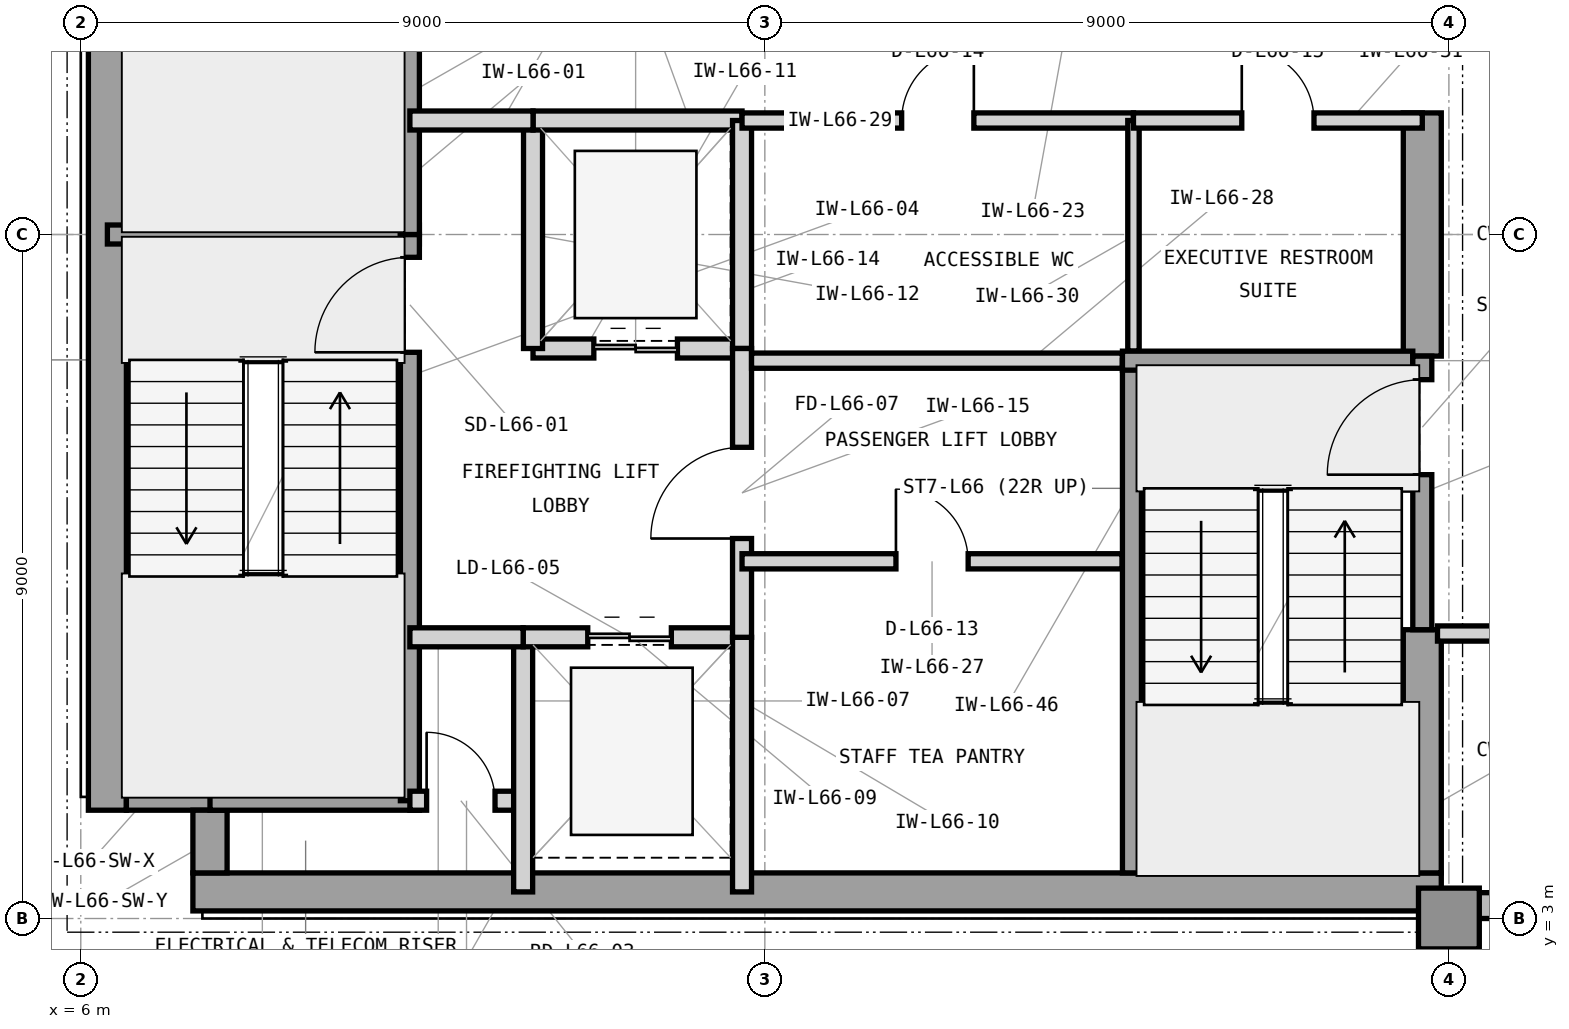
"""IFC4 building model, lengths in metres.
Left out: names, types, materials, properties, quantities, classifications, styles, units other than length and angle.
Written with IfcOpenShell. Run it as: python <this file> out.ifc"""

import sys

from ifc_helpers import new_model, si_unit, direction, frame, frame_2d, origin, origin_2d, place, context, subcontext, project, spatial, rectangle, extrude, element, fill, save


model = new_model("IFC4")
c1 = context("Model", 3, precision=1e-05, world=origin(), true_north=direction((0.0, 1.0)))
c2 = subcontext(c1, "Body", "Model", "MODEL_VIEW")
j1 = project(units=[si_unit("LENGTHUNIT", "METRE"), si_unit("PLANEANGLEUNIT", "RADIAN")], contexts=[c1])
p1 = place(None, origin())
s1 = spatial("IfcSite", under=j1, at=p1, CompositionType="ELEMENT")
p2 = place(p1, origin())
s2 = spatial("IfcBuilding", under=s1, at=p2, CompositionType="ELEMENT")
p3 = place(p2, frame((0.0, 0.0, 270.3)))
s3 = spatial("IfcBuildingStorey", under=s2, at=p3, CompositionType="ELEMENT", Elevation=270.3)
p4 = place(p3, frame((7.475, 3.35, 0.0), z_axis=(0.0, 0.0, 1.0), x_axis=(1.0, 0.0, 0.0)))
e1 = element("IfcWall", 1, at=p4, inside=s3, PredefinedType="SHEAR", context=c2, shape_type="SweptSolid", body=[
    extrude(rectangle(XDim=16.425, YDim=0.5, at=frame_2d((8.212, 0.0))), origin(), (0.0, 0.0, 1.0), 3.9),
])
p5 = place(p3, frame((6.35, 4.425, 0.0), z_axis=(0.0, 0.0, 1.0), x_axis=(0.0, 1.0, 0.0)))
e2 = element("IfcWall", 2, at=p5, inside=s3, PredefinedType="SHEAR", context=c2, shape_type="SweptSolid", body=[
    extrude(rectangle(XDim=15.15, YDim=0.5, at=frame_2d((7.575, 0.0))), origin(), (0.0, 0.0, 1.0), 3.9),
])
p6 = place(p3, frame((23.65, 3.6, 0.0), z_axis=(0.0, 0.0, 1.0), x_axis=(0.0, 1.0, 0.0)))
e3 = element("IfcWall", 3, at=p6, inside=s3, PredefinedType="SHEAR", context=c2, shape_type="SweptSolid", body=[
    extrude(rectangle(XDim=3.2, YDim=0.5, at=frame_2d((1.6, 0.0))), origin(), (0.0, 0.0, 1.0), 3.9),
])
p7 = place(p3, frame((23.65, 10.4, 0.0), z_axis=(0.0, 0.0, 1.0), x_axis=(0.0, 1.0, 0.0)))
e4 = element("IfcWall", 4, at=p7, inside=s3, PredefinedType="SHEAR", context=c2, shape_type="SweptSolid", body=[
    extrude(rectangle(XDim=3.2, YDim=0.5, at=frame_2d((1.6, 0.0))), origin(), (0.0, 0.0, 1.0), 3.9),
])
p8 = place(p3, frame((6.6, 4.65, 0.0), z_axis=(0.0, 0.0, 1.0), x_axis=(1.0, 0.0, 0.0)))
e5 = element("IfcWall", 5, at=p8, inside=s3, PredefinedType="SHEAR", context=c2, shape_type="SweptSolid", body=[
    extrude(rectangle(XDim=1.325, YDim=0.45, at=frame_2d((0.663, 0.0))), origin(), (0.0, 0.0, 1.0), 3.9),
])
p9 = place(p3, frame((7.7, 3.6, 0.0), z_axis=(0.0, 0.0, 1.0), x_axis=(0.0, 1.0, 0.0)))
e6 = element("IfcWall", 6, at=p9, inside=s3, PredefinedType="SHEAR", context=c2, shape_type="SweptSolid", body=[
    extrude(rectangle(XDim=0.825, YDim=0.45, at=frame_2d((0.413, 0.0))), origin(), (0.0, 0.0, 1.0), 3.9),
])
p10 = place(p3, frame((24.0, 3.0, 0.0), z_axis=(0.0, 0.0, 1.0), x_axis=(1.0, 0.0, 0.0)))
e7 = element("IfcColumn", 7, at=p10, inside=s3, PredefinedType="COLUMN", context=c2, shape_type="SweptSolid", body=[
    extrude(rectangle(XDim=0.8, YDim=0.8, at=origin_2d()), origin(), (0.0, 0.0, 1.0), 3.9),
])
p11 = place(p3, frame((23.9, 3.17, 0.0), z_axis=(0.0, 0.0, 1.0), x_axis=(1.0, 0.0, 0.0)))
e8 = element("IfcWall", 8, at=p11, inside=s3, PredefinedType="STANDARD", context=c2, shape_type="SweptSolid", body=[
    extrude(rectangle(XDim=28.5, YDim=0.34, at=frame_2d((14.25, 0.0))), origin(), (0.0, 0.0, 1.0), 3.715),
])
p12 = place(p11, frame((10.575, 0.0, 0.8)))
e9 = element("IfcOpeningElement", 9, at=p12, cuts=e8, PredefinedType="OPENING", context=c2, shape_type="SweptSolid", body=[
    extrude(rectangle(XDim=2.6, YDim=2.35, at=frame_2d((1.3, 1.175))), frame((0.0, 0.18, 0.0), z_axis=(0.0, -1.0, 0.0), x_axis=(1.0, 0.0, 0.0)), (0.0, 0.0, 1.0), 0.36),
])
p13 = place(p11, frame((1.1, 0.0, 0.8)))
e10 = element("IfcOpeningElement", 10, at=p13, cuts=e8, PredefinedType="OPENING", context=c2, shape_type="SweptSolid", body=[
    extrude(rectangle(XDim=1.2, YDim=2.35, at=frame_2d((0.6, 1.175))), frame((0.0, 0.18, 0.0), z_axis=(0.0, -1.0, 0.0), x_axis=(1.0, 0.0, 0.0)), (0.0, 0.0, 1.0), 0.36),
])
p14 = place(p11, frame((3.826, 0.0, 0.8)))
e11 = element("IfcOpeningElement", 11, at=p14, cuts=e8, PredefinedType="OPENING", context=c2, shape_type="SweptSolid", body=[
    extrude(rectangle(XDim=2.6, YDim=2.35, at=frame_2d((1.3, 1.175))), frame((0.0, 0.18, 0.0), z_axis=(0.0, -1.0, 0.0), x_axis=(1.0, 0.0, 0.0)), (0.0, 0.0, 1.0), 0.36),
])
p15 = place(p11, frame((14.525, 0.0, 0.8)))
e12 = element("IfcOpeningElement", 12, at=p15, cuts=e8, PredefinedType="OPENING", context=c2, shape_type="SweptSolid", body=[
    extrude(rectangle(XDim=2.6, YDim=2.35, at=frame_2d((1.3, 1.175))), frame((0.0, 0.18, 0.0), z_axis=(0.0, -1.0, 0.0), x_axis=(1.0, 0.0, 0.0)), (0.0, 0.0, 1.0), 0.36),
])
p16 = place(p3, frame((6.35, 12.0, 0.0), z_axis=(0.0, 0.0, 1.0), x_axis=(1.0, 0.0, 0.0)))
e13 = element("IfcWall", 13, at=p16, inside=s3, PredefinedType="SHEAR", context=c2, shape_type="SweptSolid", body=[
    extrude(rectangle(XDim=4.105, YDim=0.25, at=frame_2d((2.052, 0.0))), origin(), (0.0, 0.0, 1.0), 3.9),
])
p17 = place(p3, frame((7.7, 4.55, 0.0), z_axis=(0.0, 0.0, 1.0), x_axis=(1.0, 0.0, 0.0)))
e14 = element("IfcWall", 14, at=p17, inside=s3, PredefinedType="SHEAR", context=c2, shape_type="SweptSolid", body=[
    extrude(rectangle(XDim=2.755, YDim=0.25, at=frame_2d((1.377, 0.0))), origin(), (0.0, 0.0, 1.0), 3.9),
])
p18 = place(p3, frame((10.33, 4.55, 0.0), z_axis=(0.0, 0.0, 1.0), x_axis=(0.0, 1.0, 0.0)))
e15 = element("IfcWall", 15, at=p18, inside=s3, PredefinedType="SHEAR", context=c2, shape_type="SweptSolid", body=[
    extrude(rectangle(XDim=7.45, YDim=0.25, at=frame_2d((3.725, 0.0))), origin(), (0.0, 0.0, 1.0), 3.9),
])
p19 = place(p18, frame((5.9, 0.0, 0.0)))
e16 = element("IfcOpeningElement", 16, at=p19, cuts=e15, PredefinedType="OPENING", context=c2, shape_type="SweptSolid", body=[
    extrude(rectangle(XDim=1.25, YDim=2.2, at=frame_2d((0.625, 1.1))), frame((0.0, 0.135, 0.0), z_axis=(0.0, -1.0, 0.0), x_axis=(1.0, 0.0, 0.0)), (0.0, 0.0, 1.0), 0.27),
])
p20 = place(p3, frame((10.33, 12.0, 0.0), z_axis=(0.0, 0.0, 1.0), x_axis=(0.0, 1.0, 0.0)))
e17 = element("IfcWall", 17, at=p20, inside=s3, PredefinedType="SHEAR", context=c2, shape_type="SweptSolid", body=[
    extrude(rectangle(XDim=7.45, YDim=0.25, at=frame_2d((3.725, 0.0))), origin(), (0.0, 0.0, 1.0), 3.9),
])
p21 = place(p20, frame((5.85, 0.0, 0.0)))
e18 = element("IfcOpeningElement", 18, at=p21, cuts=e17, PredefinedType="OPENING", context=c2, shape_type="SweptSolid", body=[
    extrude(rectangle(XDim=1.25, YDim=2.2, at=frame_2d((0.625, 1.1))), frame((0.0, 0.135, 0.0), z_axis=(0.0, -1.0, 0.0), x_axis=(1.0, 0.0, 0.0)), (0.0, 0.0, 1.0), 0.27),
])
p22 = place(p3, frame((10.33, 4.55, 0.0), z_axis=(0.0, 0.0, 1.0), x_axis=(1.0, 0.0, 0.0)))
e19 = element("IfcWall", 19, at=p22, inside=s3, PredefinedType="PARTITIONING", context=c2, shape_type="SweptSolid", body=[
    extrude(rectangle(XDim=1.49, YDim=0.25, at=frame_2d((0.745, 0.0))), origin(), (0.0, 0.0, 1.0), 3.705),
])
p23 = place(p22, frame((0.22, 0.0, 0.0)))
e20 = element("IfcOpeningElement", 20, at=p23, cuts=e19, PredefinedType="OPENING", context=c2, shape_type="SweptSolid", body=[
    extrude(rectangle(XDim=0.9, YDim=2.1, at=frame_2d((0.45, 1.05))), frame((0.0, 0.135, 0.0), z_axis=(0.0, -1.0, 0.0), x_axis=(1.0, 0.0, 0.0)), (0.0, 0.0, 1.0), 0.27),
])
p24 = place(p3, frame((11.82, 3.35, 0.0), z_axis=(0.0, 0.0, 1.0), x_axis=(0.0, 1.0, 0.0)))
e21 = element("IfcWall", 21, at=p24, inside=s3, PredefinedType="PARTITIONING", context=c2, shape_type="SweptSolid", body=[
    extrude(rectangle(XDim=3.35, YDim=0.25, at=frame_2d((1.675, 0.0))), origin(), (0.0, 0.0, 1.0), 3.705),
])
p25 = place(p3, frame((11.82, 6.7, 0.0), z_axis=(0.0, 0.0, 1.0), x_axis=(1.0, 0.0, 0.0)))
e22 = element("IfcWall", 22, at=p25, inside=s3, PredefinedType="PARTITIONING", context=c2, shape_type="SweptSolid", body=[
    extrude(rectangle(XDim=2.88, YDim=0.25, at=frame_2d((1.44, 0.0))), origin(), (0.0, 0.0, 1.0), 3.088),
])
p26 = place(p25, frame((0.85, 0.0, 0.0)))
e23 = element("IfcOpeningElement", 23, at=p26, cuts=e22, PredefinedType="OPENING", context=c2, shape_type="SweptSolid", body=[
    extrude(rectangle(XDim=1.1, YDim=2.25, at=frame_2d((0.55, 1.125))), frame((0.0, 0.135, 0.0), z_axis=(0.0, -1.0, 0.0), x_axis=(1.0, 0.0, 0.0)), (0.0, 0.0, 1.0), 0.27),
])
p27 = place(p3, frame((14.7, 3.35, 0.0), z_axis=(0.0, 0.0, 1.0), x_axis=(0.0, 1.0, 0.0)))
e24 = element("IfcWall", 24, at=p27, inside=s3, PredefinedType="PARTITIONING", context=c2, shape_type="SweptSolid", body=[
    extrude(rectangle(XDim=3.35, YDim=0.25, at=frame_2d((1.675, 0.0))), origin(), (0.0, 0.0, 1.0), 3.705),
])
p28 = place(p3, frame((11.95, 10.5, 0.0), z_axis=(0.0, 0.0, 1.0), x_axis=(1.0, 0.0, 0.0)))
e25 = element("IfcWall", 25, at=p28, inside=s3, PredefinedType="PARTITIONING", context=c2, shape_type="SweptSolid", body=[
    extrude(rectangle(XDim=2.75, YDim=0.25, at=frame_2d((1.375, 0.0))), origin(), (0.0, 0.0, 1.0), 3.088),
])
p29 = place(p28, frame((0.8, 0.0, 0.0)))
e26 = element("IfcOpeningElement", 26, at=p29, cuts=e25, PredefinedType="OPENING", context=c2, shape_type="SweptSolid", body=[
    extrude(rectangle(XDim=1.1, YDim=2.25, at=frame_2d((0.55, 1.125))), frame((0.0, 0.135, 0.0), z_axis=(0.0, -1.0, 0.0), x_axis=(1.0, 0.0, 0.0)), (0.0, 0.0, 1.0), 0.27),
])
p30 = place(p3, frame((11.95, 10.5, 0.0), z_axis=(0.0, 0.0, 1.0), x_axis=(0.0, 1.0, 0.0)))
e27 = element("IfcWall", 27, at=p30, inside=s3, PredefinedType="PARTITIONING", context=c2, shape_type="SweptSolid", body=[
    extrude(rectangle(XDim=3.0, YDim=0.25, at=frame_2d((1.5, 0.0))), origin(), (0.0, 0.0, 1.0), 3.705),
])
p31 = place(p3, frame((11.95, 13.5, 0.0), z_axis=(0.0, 0.0, 1.0), x_axis=(1.0, 0.0, 0.0)))
e28 = element("IfcWall", 28, at=p31, inside=s3, PredefinedType="PARTITIONING", context=c2, shape_type="SweptSolid", body=[
    extrude(rectangle(XDim=2.75, YDim=0.25, at=frame_2d((1.375, 0.0))), origin(), (0.0, 0.0, 1.0), 3.088),
])
p32 = place(p3, frame((14.7, 10.5, 0.0), z_axis=(0.0, 0.0, 1.0), x_axis=(0.0, 1.0, 0.0)))
e29 = element("IfcWall", 29, at=p32, inside=s3, PredefinedType="PARTITIONING", context=c2, shape_type="SweptSolid", body=[
    extrude(rectangle(XDim=3.0, YDim=0.25, at=frame_2d((1.5, 0.0))), origin(), (0.0, 0.0, 1.0), 3.705),
])
p33 = place(p3, frame((14.7, 6.7, 0.0), z_axis=(0.0, 0.0, 1.0), x_axis=(0.0, 1.0, 0.0)))
e30 = element("IfcWall", 30, at=p33, inside=s3, PredefinedType="PARTITIONING", context=c2, shape_type="SweptSolid", body=[
    extrude(rectangle(XDim=3.8, YDim=0.25, at=frame_2d((1.9, 0.0))), origin(), (0.0, 0.0, 1.0), 3.705),
])
p34 = place(p33, frame((1.3, 0.0, 0.0)))
e31 = element("IfcOpeningElement", 31, at=p34, cuts=e30, PredefinedType="OPENING", context=c2, shape_type="SweptSolid", body=[
    extrude(rectangle(XDim=1.2, YDim=2.2, at=frame_2d((0.6, 1.1))), frame((0.0, 0.135, 0.0), z_axis=(0.0, -1.0, 0.0), x_axis=(1.0, 0.0, 0.0)), (0.0, 0.0, 1.0), 0.27),
])
p35 = place(p3, frame((10.33, 13.5, 0.0), z_axis=(0.0, 0.0, 1.0), x_axis=(1.0, 0.0, 0.0)))
e32 = element("IfcWall", 32, at=p35, inside=s3, PredefinedType="PARTITIONING", context=c2, shape_type="SweptSolid", body=[
    extrude(rectangle(XDim=1.62, YDim=0.25, at=frame_2d((0.81, 0.0))), origin(), (0.0, 0.0, 1.0), 3.088),
])
p36 = place(p3, frame((10.33, 6.7, 0.0), z_axis=(0.0, 0.0, 1.0), x_axis=(1.0, 0.0, 0.0)))
e33 = element("IfcWall", 33, at=p36, inside=s3, PredefinedType="PARTITIONING", context=c2, shape_type="SweptSolid", body=[
    extrude(rectangle(XDim=1.49, YDim=0.25, at=frame_2d((0.745, 0.0))), origin(), (0.0, 0.0, 1.0), 3.088),
])
p37 = place(p3, frame((14.7, 7.7, 0.0), z_axis=(0.0, 0.0, 1.0), x_axis=(1.0, 0.0, 0.0)))
e34 = element("IfcWall", 34, at=p37, inside=s3, PredefinedType="PARTITIONING", context=c2, shape_type="SweptSolid", body=[
    extrude(rectangle(XDim=5.0, YDim=0.2, at=frame_2d((2.5, 0.0))), origin(), (0.0, 0.0, 1.0), 3.705),
])
p38 = place(p37, frame((2.025, 0.0, 0.0)))
e35 = element("IfcOpeningElement", 35, at=p38, cuts=e34, PredefinedType="OPENING", context=c2, shape_type="SweptSolid", body=[
    extrude(rectangle(XDim=0.95, YDim=2.1, at=frame_2d((0.475, 1.05))), frame((0.0, 0.11, 0.0), z_axis=(0.0, -1.0, 0.0), x_axis=(1.0, 0.0, 0.0)), (0.0, 0.0, 1.0), 0.22),
])
p39 = place(p3, frame((14.825, 10.34, 0.0), z_axis=(0.0, 0.0, 1.0), x_axis=(1.0, 0.0, 0.0)))
e36 = element("IfcWall", 36, at=p39, inside=s3, PredefinedType="PARTITIONING", context=c2, shape_type="SweptSolid", body=[
    extrude(rectangle(XDim=4.88, YDim=0.2, at=frame_2d((2.44, 0.0))), origin(), (0.0, 0.0, 1.0), 3.088),
])
p40 = place(p3, frame((14.7, 13.5, 0.0), z_axis=(0.0, 0.0, 1.0), x_axis=(1.0, 0.0, 0.0)))
e37 = element("IfcWall", 37, at=p40, inside=s3, PredefinedType="PARTITIONING", context=c2, shape_type="SweptSolid", body=[
    extrude(rectangle(XDim=5.15, YDim=0.2, at=frame_2d((2.575, 0.0))), origin(), (0.0, 0.0, 1.0), 3.088),
])
p41 = place(p40, frame((2.1, 0.0, 0.0)))
e38 = element("IfcOpeningElement", 38, at=p41, cuts=e37, PredefinedType="OPENING", context=c2, shape_type="SweptSolid", body=[
    extrude(rectangle(XDim=0.95, YDim=2.1, at=frame_2d((0.475, 1.05))), frame((0.0, 0.11, 0.0), z_axis=(0.0, -1.0, 0.0), x_axis=(1.0, 0.0, 0.0)), (0.0, 0.0, 1.0), 0.22),
])
p42 = place(p3, frame((19.85, 10.465, 0.0), z_axis=(0.0, 0.0, 1.0), x_axis=(0.0, 1.0, 0.0)))
e39 = element("IfcWall", 39, at=p42, inside=s3, PredefinedType="PARTITIONING", context=c2, shape_type="SweptSolid", body=[
    extrude(rectangle(XDim=3.035, YDim=0.15, at=frame_2d((1.518, 0.0))), origin(), (0.0, 0.0, 1.0), 3.705),
])
p43 = place(p3, frame((19.85, 13.5, 0.0), z_axis=(0.0, 0.0, 1.0), x_axis=(1.0, 0.0, 0.0)))
e40 = element("IfcWall", 40, at=p43, inside=s3, PredefinedType="PARTITIONING", context=c2, shape_type="SweptSolid", body=[
    extrude(rectangle(XDim=3.8, YDim=0.2, at=frame_2d((1.9, 0.0))), origin(), (0.0, 0.0, 1.0), 3.088),
])
p44 = place(p43, frame((1.425, 0.0, 0.0)))
e41 = element("IfcOpeningElement", 41, at=p44, cuts=e40, PredefinedType="OPENING", context=c2, shape_type="SweptSolid", body=[
    extrude(rectangle(XDim=0.95, YDim=2.1, at=frame_2d((0.475, 1.05))), frame((0.0, 0.11, 0.0), z_axis=(0.0, -1.0, 0.0), x_axis=(1.0, 0.0, 0.0)), (0.0, 0.0, 1.0), 0.22),
])
p45 = place(p3, frame((23.85, 6.75, 0.0), z_axis=(0.0, 0.0, 1.0), x_axis=(1.0, 0.0, 0.0)))
e42 = element("IfcWall", 42, at=p45, inside=s3, PredefinedType="PARTITIONING", context=c2, shape_type="SweptSolid", body=[
    extrude(rectangle(XDim=3.05, YDim=0.2, at=frame_2d((1.525, 0.0))), origin(), (0.0, 0.0, 1.0), 3.705),
])
p46 = place(p45, frame((0.9, 0.0, 0.0)))
e43 = element("IfcOpeningElement", 43, at=p46, cuts=e42, PredefinedType="OPENING", context=c2, shape_type="SweptSolid", body=[
    extrude(rectangle(XDim=1.0, YDim=2.15, at=frame_2d((0.5, 1.075))), frame((0.0, 0.11, 0.0), z_axis=(0.0, -1.0, 0.0), x_axis=(1.0, 0.0, 0.0)), (0.0, 0.0, 1.0), 0.22),
])
p47 = place(p3, frame((19.83, 3.6, 0.0), z_axis=(0.0, 0.0, 1.0), x_axis=(0.0, 1.0, 0.0)))
e44 = element("IfcWall", 44, at=p47, inside=s3, PredefinedType="SHEAR", context=c2, shape_type="SweptSolid", body=[
    extrude(rectangle(XDim=6.74, YDim=0.25, at=frame_2d((3.37, 0.0))), origin(), (0.0, 0.0, 1.0), 3.9),
])
p48 = place(p3, frame((19.705, 10.34, 0.0), z_axis=(0.0, 0.0, 1.0), x_axis=(1.0, 0.0, 0.0)))
e45 = element("IfcWall", 45, at=p48, inside=s3, PredefinedType="SHEAR", context=c2, shape_type="SweptSolid", body=[
    extrude(rectangle(XDim=3.82, YDim=0.25, at=frame_2d((1.91, 0.0))), origin(), (0.0, 0.0, 1.0), 3.9),
])
p49 = place(p3, frame((23.65, 6.8, 0.0), z_axis=(0.0, 0.0, 1.0), x_axis=(0.0, 1.0, 0.0)))
e46 = element("IfcWall", 46, at=p49, inside=s3, PredefinedType="SHEAR", context=c2, shape_type="SweptSolid", body=[
    extrude(rectangle(XDim=3.6, YDim=0.25, at=frame_2d((1.8, 0.0))), origin(), (0.0, 0.0, 1.0), 3.9),
])
p50 = place(p49, frame((2.04, 0.0, 0.0)))
e47 = element("IfcOpeningElement", 47, at=p50, cuts=e46, PredefinedType="OPENING", context=c2, shape_type="SweptSolid", body=[
    extrude(rectangle(XDim=1.25, YDim=2.2, at=frame_2d((0.625, 1.1))), frame((0.0, 0.135, 0.0), z_axis=(0.0, -1.0, 0.0), x_axis=(1.0, 0.0, 0.0)), (0.0, 0.0, 1.0), 0.27),
])
p51 = place(p19, origin())
e48 = element("IfcDoor", 48, at=p51, inside=s3, OperationType="SINGLE_SWING_LEFT", PredefinedType="DOOR", context=c2, shape_type="SweptSolid", body=[
    extrude(rectangle(XDim=1.25, YDim=2.2, at=frame_2d((0.625, 1.1))), frame((0.0, 0.025, 0.0), z_axis=(0.0, -1.0, 0.0), x_axis=(1.0, 0.0, 0.0)), (0.0, 0.0, 1.0), 0.05),
])
fill(e16, e48)
p52 = place(p23, origin())
e49 = element("IfcDoor", 49, at=p52, inside=s3, OperationType="SINGLE_SWING_LEFT", PredefinedType="TRAPDOOR", context=c2, shape_type="SweptSolid", body=[
    extrude(rectangle(XDim=0.9, YDim=2.1, at=frame_2d((0.45, 1.05))), frame((0.0, 0.025, 0.0), z_axis=(0.0, -1.0, 0.0), x_axis=(1.0, 0.0, 0.0)), (0.0, 0.0, 1.0), 0.05),
])
fill(e20, e49)
p53 = place(p26, origin())
e50 = element("IfcDoor", 50, at=p53, inside=s3, OperationType="DOUBLE_DOOR_SLIDING", PredefinedType="DOOR", context=c2, shape_type="SweptSolid", body=[
    extrude(rectangle(XDim=1.1, YDim=2.25, at=frame_2d((0.55, 1.125))), frame((0.0, 0.025, 0.0), z_axis=(0.0, -1.0, 0.0), x_axis=(1.0, 0.0, 0.0)), (0.0, 0.0, 1.0), 0.05),
])
fill(e23, e50)
p54 = place(p29, origin())
e51 = element("IfcDoor", 51, at=p54, inside=s3, OperationType="DOUBLE_DOOR_SLIDING", PredefinedType="DOOR", context=c2, shape_type="SweptSolid", body=[
    extrude(rectangle(XDim=1.1, YDim=2.25, at=frame_2d((0.55, 1.125))), frame((0.0, 0.025, 0.0), z_axis=(0.0, -1.0, 0.0), x_axis=(1.0, 0.0, 0.0)), (0.0, 0.0, 1.0), 0.05),
])
fill(e26, e51)
p55 = place(p34, origin())
e52 = element("IfcDoor", 52, at=p55, inside=s3, OperationType="SINGLE_SWING_LEFT", PredefinedType="DOOR", context=c2, shape_type="SweptSolid", body=[
    extrude(rectangle(XDim=1.2, YDim=2.2, at=frame_2d((0.6, 1.1))), frame((0.0, 0.025, 0.0), z_axis=(0.0, -1.0, 0.0), x_axis=(1.0, 0.0, 0.0)), (0.0, 0.0, 1.0), 0.05),
])
fill(e31, e52)
p56 = place(p38, origin())
e53 = element("IfcDoor", 53, at=p56, inside=s3, OperationType="SINGLE_SWING_LEFT", PredefinedType="DOOR", context=c2, shape_type="SweptSolid", body=[
    extrude(rectangle(XDim=0.95, YDim=2.1, at=frame_2d((0.475, 1.05))), frame((0.0, 0.025, 0.0), z_axis=(0.0, -1.0, 0.0), x_axis=(1.0, 0.0, 0.0)), (0.0, 0.0, 1.0), 0.05),
])
fill(e35, e53)
p57 = place(p41, origin())
e54 = element("IfcDoor", 54, at=p57, inside=s3, OperationType="SINGLE_SWING_RIGHT", PredefinedType="DOOR", context=c2, shape_type="SweptSolid", body=[
    extrude(rectangle(XDim=0.95, YDim=2.1, at=frame_2d((0.475, 1.05))), frame((0.0, 0.025, 0.0), z_axis=(0.0, -1.0, 0.0), x_axis=(1.0, 0.0, 0.0)), (0.0, 0.0, 1.0), 0.05),
])
fill(e38, e54)
p58 = place(p44, origin())
e55 = element("IfcDoor", 55, at=p58, inside=s3, OperationType="SINGLE_SWING_LEFT", PredefinedType="DOOR", context=c2, shape_type="SweptSolid", body=[
    extrude(rectangle(XDim=0.95, YDim=2.1, at=frame_2d((0.475, 1.05))), frame((0.0, 0.025, 0.0), z_axis=(0.0, -1.0, 0.0), x_axis=(1.0, 0.0, 0.0)), (0.0, 0.0, 1.0), 0.05),
])
fill(e41, e55)
p59 = place(p50, origin())
e56 = element("IfcDoor", 56, at=p59, inside=s3, OperationType="SINGLE_SWING_LEFT", PredefinedType="DOOR", context=c2, shape_type="SweptSolid", body=[
    extrude(rectangle(XDim=1.25, YDim=2.2, at=frame_2d((0.625, 1.1))), frame((0.0, 0.025, 0.0), z_axis=(0.0, -1.0, 0.0), x_axis=(1.0, 0.0, 0.0)), (0.0, 0.0, 1.0), 0.05),
])
fill(e47, e56)
save(model, sys.argv[1])
